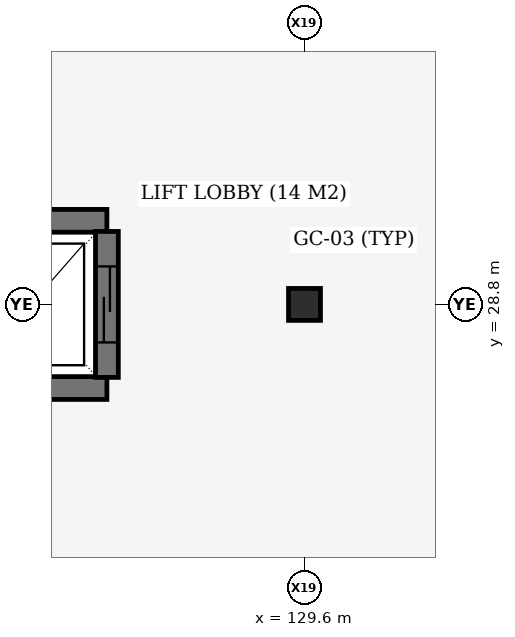
"""IFC4 building model, lengths in metres.
Left out: names, types, materials, properties, quantities, classifications, styles, units other than length and angle.
Written with IfcOpenShell. Run it as: python <this file> out.ifc"""

import sys

from ifc_helpers import new_model, si_unit, direction, frame, frame_2d, origin, origin_2d, place, context, subcontext, project, spatial, rectangle, extrude, element, fill, save


model = new_model("IFC4")
c1 = context("Model", 3, precision=1e-05, world=origin(), true_north=direction((0.0, 1.0)))
c2 = subcontext(c1, "Body", "Model", "MODEL_VIEW")
j1 = project(units=[si_unit("LENGTHUNIT", "METRE"), si_unit("PLANEANGLEUNIT", "RADIAN")], contexts=[c1])
p1 = place(None, origin())
s1 = spatial("IfcSite", under=j1, at=p1, CompositionType="ELEMENT")
p2 = place(p1, origin())
s2 = spatial("IfcBuilding", under=s1, at=p2, CompositionType="ELEMENT")
p3 = place(p2, frame((0.0, 0.0, 9.6)))
s3 = spatial("IfcBuildingStorey", under=s2, at=p3, CompositionType="ELEMENT", Elevation=9.6)
p4 = place(p3, frame((129.6, 28.8, 0.0), z_axis=(0.0, 0.0, 1.0), x_axis=(1.0, 0.0, 0.0)))
e1 = element("IfcColumn", 1, at=p4, inside=s3, PredefinedType="COLUMN", context=c2, shape_type="SweptSolid", body=[
    extrude(rectangle(XDim=0.42, YDim=0.42, at=origin_2d()), origin(), (0.0, 0.0, 1.0), 3.92),
])
for number, where, z_axis, x_axis in (
    (2, (125.0, 27.7, 0.0), (0.0, 0.0, 1.0), (1.0, 0.0, 0.0)),
    (3, (127.0, 29.9, 0.0), (0.0, 0.0, 1.0), (-1.0, 0.0, 0.0)),
):
    element("IfcWall", number, at=place(p3, frame(where, z_axis=z_axis, x_axis=x_axis)), inside=s3, PredefinedType="SHEAR", context=c2, shape_type="SweptSolid", body=[
        extrude(rectangle(XDim=2.0, YDim=0.3, at=frame_2d((1.0, 0.0))), origin(), (0.0, 0.0, 1.0), 3.92),
    ])
p5 = place(p3, frame((127.0, 29.76, 0.0), z_axis=(0.0, 0.0, 1.0), x_axis=(0.0, -1.0, 0.0)))
e4 = element("IfcWall", 4, at=p5, inside=s3, PredefinedType="SHEAR", context=c2, shape_type="SweptSolid", body=[
    extrude(rectangle(XDim=1.92, YDim=0.3, at=frame_2d((0.96, 0.0))), origin(), (0.0, 0.0, 1.0), 3.92),
])
p6 = place(p5, frame((0.46, 0.0, 0.0)))
e5 = element("IfcOpeningElement", 5, at=p6, cuts=e4, PredefinedType="OPENING", context=c2, shape_type="SweptSolid", body=[
    extrude(rectangle(XDim=1.0, YDim=2.1, at=frame_2d((0.5, 1.05))), frame((0.0, 0.16, 0.0), z_axis=(0.0, -1.0, 0.0), x_axis=(1.0, 0.0, 0.0)), (0.0, 0.0, 1.0), 0.32),
])
p7 = place(p6, origin())
e6 = element("IfcDoor", 6, at=p7, inside=s3, OperationType="SLIDING_TO_LEFT", PredefinedType="DOOR", context=c2, shape_type="SweptSolid", body=[
    extrude(rectangle(XDim=1.0, YDim=2.1, at=frame_2d((0.5, 1.05))), frame((0.0, 0.025, 0.0), z_axis=(0.0, -1.0, 0.0), x_axis=(1.0, 0.0, 0.0)), (0.0, 0.0, 1.0), 0.05),
])
fill(e5, e6)
save(model, sys.argv[1])
